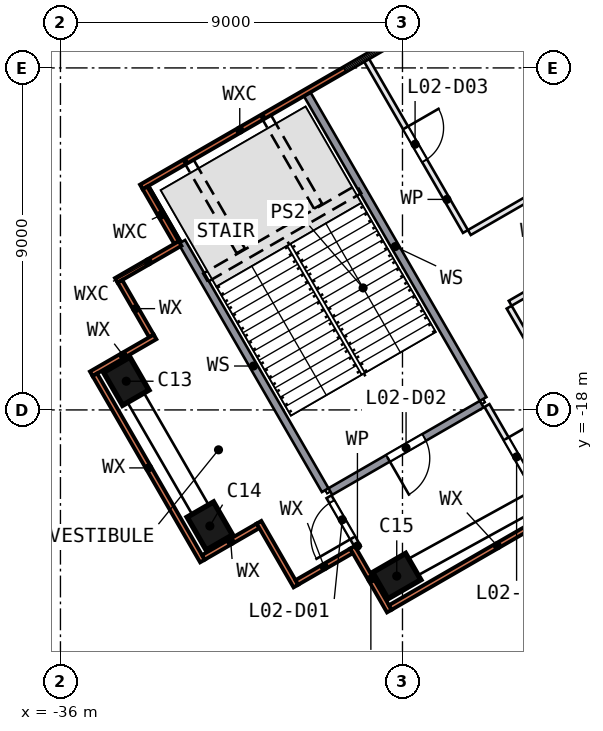
"""IFC4 building model, lengths in metres.
Left out: names, types, materials, properties, quantities, classifications, styles, units other than length and angle.
Written with IfcOpenShell. Run it as: python <this file> out.ifc"""

import sys

from ifc_helpers import new_model, si_unit, direction, frame, frame_2d, origin, origin_2d, place, context, subcontext, project, spatial, rectangle, extrude, element, fill, save


model = new_model("IFC4")
c1 = context("Model", 3, precision=1e-05, world=origin(), true_north=direction((0.0, 1.0)))
c2 = subcontext(c1, "Body", "Model", "MODEL_VIEW")
j1 = project(units=[si_unit("LENGTHUNIT", "METRE"), si_unit("PLANEANGLEUNIT", "RADIAN")], contexts=[c1])
p1 = place(None, origin())
s1 = spatial("IfcSite", under=j1, at=p1, CompositionType="ELEMENT")
p2 = place(p1, origin())
s2 = spatial("IfcBuilding", under=s1, at=p2, CompositionType="ELEMENT")
p3 = place(p2, frame((0.0, 0.0, 14.0)))
s3 = spatial("IfcBuildingStorey", under=s2, at=p3, CompositionType="ELEMENT", Elevation=14.0)
for number, where, z_axis, x_axis in (
    (1, (-34.269, -17.245, 0.0), (0.0, 0.0, 1.0), (0.5, -0.866, 0.0)),
    (2, (-32.069, -21.055, 0.0), (0.0, 0.0, 1.0), (0.5, -0.866, 0.0)),
    (3, (-27.151, -22.373, 0.0), (0.0, 0.0, 1.0), (0.866, 0.5, 0.0)),
):
    element("IfcColumn", number, at=place(p3, frame(where, z_axis=z_axis, x_axis=x_axis)), inside=s3, PredefinedType="COLUMN", context=c2, shape_type="SweptSolid", body=[
        extrude(rectangle(XDim=1.0, YDim=0.8, at=origin_2d()), origin(), (0.0, 0.0, 1.0), 4.55),
    ])
p4 = place(p3, frame((-23.995, -6.429, 0.0), z_axis=(0.0, 0.0, 1.0), x_axis=(-0.866018753, -0.500011519, 0.0)))
e4 = element("IfcWall", 4, at=p4, inside=s3, PredefinedType="SOLIDWALL", context=c2, shape_type="SweptSolid", body=[
    extrude(rectangle(XDim=11.405, YDim=0.14, at=frame_2d((5.703, 0.0))), origin(), (0.0, 0.0, 1.0), 4.55),
])
p5 = place(p4, frame((1.623, 0.0, 0.9)))
e5 = element("IfcOpeningElement", 5, at=p5, cuts=e4, PredefinedType="OPENING", context=c2, shape_type="SweptSolid", body=[
    extrude(rectangle(XDim=3.6, YDim=2.7, at=frame_2d((1.8, 1.35))), frame((0.0, 0.08, 0.0), z_axis=(0.0, -1.0, 0.0), x_axis=(1.0, 0.0, 0.0)), (0.0, 0.0, 1.0), 0.16),
])
p6 = place(p3, frame((-33.777, -12.157, 0.0), z_axis=(0.0, 0.0, 1.0), x_axis=(0.499887958, -0.866090081, 0.0)))
e6 = element("IfcWall", 6, at=p6, inside=s3, PredefinedType="SOLIDWALL", context=c2, shape_type="SweptSolid", body=[
    extrude(rectangle(XDim=1.66, YDim=0.14, at=frame_2d((0.83, 0.0))), origin(), (0.0, 0.0, 1.0), 4.55),
])
p7 = place(p3, frame((-32.851, -13.62, 0.0), z_axis=(0.0, 0.0, 1.0), x_axis=(-0.866011627, -0.500023862, 0.0)))
e7 = element("IfcWall", 7, at=p7, inside=s3, PredefinedType="SOLIDWALL", context=c2, shape_type="SweptSolid", body=[
    extrude(rectangle(XDim=1.94, YDim=0.14, at=frame_2d((0.97, 0.0))), origin(), (0.0, 0.0, 1.0), 4.55),
])
p8 = place(p3, frame((-34.436, -14.616, 0.0), z_axis=(0.0, 0.0, 1.0), x_axis=(0.500061949, -0.865989634, 0.0)))
e8 = element("IfcWall", 8, at=p8, inside=s3, PredefinedType="SOLIDWALL", context=c2, shape_type="SweptSolid", body=[
    extrude(rectangle(XDim=1.66, YDim=0.14, at=frame_2d((0.83, 0.0))), origin(), (0.0, 0.0, 1.0), 4.55),
])
p9 = place(p3, frame((-33.51, -16.079, 0.0), z_axis=(0.0, 0.0, 1.0), x_axis=(-0.866011627, -0.500023862, 0.0)))
e9 = element("IfcWall", 9, at=p9, inside=s3, PredefinedType="SOLIDWALL", context=c2, shape_type="SweptSolid", body=[
    extrude(rectangle(XDim=1.94, YDim=0.14, at=frame_2d((0.97, 0.0))), origin(), (0.0, 0.0, 1.0), 4.55),
])
p10 = place(p3, frame((-35.094, -17.075, 0.0), z_axis=(0.0, 0.0, 1.0), x_axis=(0.499998748, -0.866026127, 0.0)))
e10 = element("IfcWall", 10, at=p10, inside=s3, PredefinedType="SOLIDWALL", context=c2, shape_type="SweptSolid", body=[
    extrude(rectangle(XDim=5.66, YDim=0.14, at=frame_2d((2.83, 0.0))), origin(), (0.0, 0.0, 1.0), 4.55),
])
p11 = place(p3, frame((-32.239, -21.881, 0.0), z_axis=(0.0, 0.0, 1.0), x_axis=(0.866026406, 0.499998264, 0.0)))
e11 = element("IfcWall", 11, at=p11, inside=s3, PredefinedType="SOLIDWALL", context=c2, shape_type="SweptSolid", body=[
    extrude(rectangle(XDim=1.66, YDim=0.14, at=frame_2d((0.83, 0.0))), origin(), (0.0, 0.0, 1.0), 4.55),
])
p12 = place(p3, frame((-30.775, -20.955, 0.0), z_axis=(0.0, 0.0, 1.0), x_axis=(0.499969368, -0.866043088, 0.0)))
e12 = element("IfcWall", 12, at=p12, inside=s3, PredefinedType="SOLIDWALL", context=c2, shape_type="SweptSolid", body=[
    extrude(rectangle(XDim=1.94, YDim=0.14, at=frame_2d((0.97, 0.0))), origin(), (0.0, 0.0, 1.0), 4.55),
])
p13 = place(p3, frame((-29.78, -22.54, 0.0), z_axis=(0.0, 0.0, 1.0), x_axis=(0.865989634, 0.500061949, 0.0)))
e13 = element("IfcWall", 13, at=p13, inside=s3, PredefinedType="SOLIDWALL", context=c2, shape_type="SweptSolid", body=[
    extrude(rectangle(XDim=1.66, YDim=0.14, at=frame_2d((0.83, 0.0))), origin(), (0.0, 0.0, 1.0), 4.55),
])
p14 = place(p3, frame((-28.317, -21.614, 0.0), z_axis=(0.0, 0.0, 1.0), x_axis=(0.499969368, -0.866043088, 0.0)))
e14 = element("IfcWall", 14, at=p14, inside=s3, PredefinedType="SOLIDWALL", context=c2, shape_type="SweptSolid", body=[
    extrude(rectangle(XDim=1.94, YDim=0.14, at=frame_2d((0.97, 0.0))), origin(), (0.0, 0.0, 1.0), 4.55),
])
p15 = place(p3, frame((-27.321, -23.198, 0.0), z_axis=(0.0, 0.0, 1.0), x_axis=(0.866030546, 0.499991093, 0.0)))
e15 = element("IfcWall", 15, at=p15, inside=s3, PredefinedType="SOLIDWALL", context=c2, shape_type="SweptSolid", body=[
    extrude(rectangle(XDim=10.961, YDim=0.14, at=frame_2d((5.48, 0.0))), origin(), (0.0, 0.0, 1.0), 4.55),
])
p16 = place(p15, frame((6.702, 0.0, 0.9)))
e16 = element("IfcOpeningElement", 16, at=p16, cuts=e15, PredefinedType="OPENING", context=c2, shape_type="SweptSolid", body=[
    extrude(rectangle(XDim=3.0, YDim=2.7, at=frame_2d((1.5, 1.35))), frame((0.0, 0.08, 0.0), z_axis=(0.0, -1.0, 0.0), x_axis=(1.0, 0.0, 0.0)), (0.0, 0.0, 1.0), 0.16),
])
p17 = place(p3, frame((-32.807, -13.577, 0.0), z_axis=(0.0, 0.0, 1.0), x_axis=(0.50000534, -0.866022321, 0.0)))
e17 = element("IfcWall", 17, at=p17, inside=s3, PredefinedType="SOLIDWALL", context=c2, shape_type="SweptSolid", body=[
    extrude(rectangle(XDim=7.545, YDim=0.2, at=frame_2d((3.773, 0.0))), origin(), (0.0, 0.0, 1.0), 4.55),
])
p18 = place(p3, frame((-28.162, -21.623, 0.0), z_axis=(0.0, 0.0, 1.0), x_axis=(-0.499877454, 0.866096144, 0.0)))
e18 = element("IfcWall", 18, at=p18, inside=s3, PredefinedType="PARTITIONING", context=c2, shape_type="SweptSolid", body=[
    extrude(rectangle(XDim=1.545, YDim=0.15, at=frame_2d((0.773, 0.0))), origin(), (0.0, 0.0, 1.0), 4.55),
])
p19 = place(p18, frame((0.295, 0.0, 0.0)))
e19 = element("IfcOpeningElement", 19, at=p19, cuts=e18, PredefinedType="OPENING", context=c2, shape_type="SweptSolid", body=[
    extrude(rectangle(XDim=1.1, YDim=2.1, at=frame_2d((0.55, 1.05))), frame((0.0, 0.085, 0.0), z_axis=(0.0, -1.0, 0.0), x_axis=(1.0, 0.0, 0.0)), (0.0, 0.0, 1.0), 0.17),
])
p20 = place(p3, frame((-24.914, -17.848, 0.0), z_axis=(0.0, 0.0, 1.0), x_axis=(-0.86601677, -0.500014953, 0.0)))
e20 = element("IfcWall", 20, at=p20, inside=s3, PredefinedType="SOLIDWALL", context=c2, shape_type="SweptSolid", body=[
    extrude(rectangle(XDim=4.6, YDim=0.2, at=frame_2d((2.3, 0.0))), origin(), (0.0, 0.0, 1.0), 4.55),
])
p21 = place(p20, frame((1.75, 0.0, 0.0)))
e21 = element("IfcOpeningElement", 21, at=p21, cuts=e20, PredefinedType="OPENING", context=c2, shape_type="SweptSolid", body=[
    extrude(rectangle(XDim=1.1, YDim=2.1, at=frame_2d((0.55, 1.05))), frame((0.0, 0.11, 0.0), z_axis=(0.0, -1.0, 0.0), x_axis=(1.0, 0.0, 0.0)), (0.0, 0.0, 1.0), 0.22),
])
p22 = place(p3, frame((-27.948, -8.792, 0.0), z_axis=(0.0, 0.0, 1.0), x_axis=(0.499979347, -0.866037328, 0.0)))
e22 = element("IfcWall", 22, at=p22, inside=s3, PredefinedType="PARTITIONING", context=c2, shape_type="SweptSolid", body=[
    extrude(rectangle(XDim=5.21, YDim=0.15, at=frame_2d((2.605, 0.0))), origin(), (0.0, 0.0, 1.0), 4.55),
])
p23 = place(p22, frame((2.06, 0.0, 0.0)))
e23 = element("IfcOpeningElement", 23, at=p23, cuts=e22, PredefinedType="OPENING", context=c2, shape_type="SweptSolid", body=[
    extrude(rectangle(XDim=1.0, YDim=2.1, at=frame_2d((0.5, 1.05))), frame((0.0, 0.085, 0.0), z_axis=(0.0, -1.0, 0.0), x_axis=(1.0, 0.0, 0.0)), (0.0, 0.0, 1.0), 0.17),
])
p24 = place(p3, frame((-24.877, -17.712, 0.0), z_axis=(0.0, 0.0, 1.0), x_axis=(-0.499984148, 0.866034555, 0.0)))
e24 = element("IfcWall", 24, at=p24, inside=s3, PredefinedType="SOLIDWALL", context=c2, shape_type="SweptSolid", body=[
    extrude(rectangle(XDim=9.26, YDim=0.2, at=frame_2d((4.63, 0.0))), origin(), (0.0, 0.0, 1.0), 4.55),
])
p25 = place(p3, frame((-20.886, -13.3, 0.0), z_axis=(0.0, 0.0, 1.0), x_axis=(-0.866012734, -0.500021944, 0.0)))
e25 = element("IfcWall", 25, at=p25, inside=s3, PredefinedType="PARTITIONING", context=c2, shape_type="SweptSolid", body=[
    extrude(rectangle(XDim=3.787, YDim=0.15, at=frame_2d((1.894, 0.0))), origin(), (0.0, 0.0, 1.0), 4.55),
])
p26 = place(p25, frame((1.437, 0.0, 0.0)))
e26 = element("IfcOpeningElement", 26, at=p26, cuts=e25, PredefinedType="OPENING", context=c2, shape_type="SweptSolid", body=[
    extrude(rectangle(XDim=1.0, YDim=2.1, at=frame_2d((0.5, 1.05))), frame((0.0, 0.085, 0.0), z_axis=(0.0, -1.0, 0.0), x_axis=(1.0, 0.0, 0.0)), (0.0, 0.0, 1.0), 0.17),
])
p27 = place(p3, frame((-24.777, -17.885, 0.0), z_axis=(0.0, 0.0, 1.0), x_axis=(0.499996863, -0.866027215, 0.0)))
e27 = element("IfcWall", 27, at=p27, inside=s3, PredefinedType="PARTITIONING", context=c2, shape_type="SweptSolid", body=[
    extrude(rectangle(XDim=3.26, YDim=0.15, at=frame_2d((1.63, 0.0))), origin(), (0.0, 0.0, 1.0), 4.55),
])
p28 = place(p27, frame((1.01, 0.0, 0.0)))
e28 = element("IfcOpeningElement", 28, at=p28, cuts=e27, PredefinedType="OPENING", context=c2, shape_type="SweptSolid", body=[
    extrude(rectangle(XDim=1.1, YDim=2.1, at=frame_2d((0.55, 1.05))), frame((0.0, 0.085, 0.0), z_axis=(0.0, -1.0, 0.0), x_axis=(1.0, 0.0, 0.0)), (0.0, 0.0, 1.0), 0.17),
])
p29 = place(p3, frame((-21.588, -19.808, 0.0), z_axis=(0.0, 0.0, 1.0), x_axis=(-0.499999637, 0.866025613, 0.0)))
e29 = element("IfcWall", 29, at=p29, inside=s3, PredefinedType="PARTITIONING", context=c2, shape_type="SweptSolid", body=[
    extrude(rectangle(XDim=5.21, YDim=0.15, at=frame_2d((2.605, 0.0))), origin(), (0.0, 0.0, 1.0), 4.55),
])
p30 = place(p3, frame((-21.961, -11.438, 0.0), z_axis=(0.0, 0.0, 1.0), x_axis=(-0.866040651, -0.499973591, 0.0)))
e30 = element("IfcWall", 30, at=p30, inside=s3, PredefinedType="PARTITIONING", context=c2, shape_type="SweptSolid", body=[
    extrude(rectangle(XDim=3.787, YDim=0.15, at=frame_2d((1.894, 0.0))), origin(), (0.0, 0.0, 1.0), 4.55),
])
p31 = place(p5, origin())
e31 = element("IfcWindow", 31, at=p31, inside=s3, PartitioningType="SINGLE_PANEL", PredefinedType="WINDOW", context=c2, shape_type="SweptSolid", body=[
    extrude(rectangle(XDim=3.6, YDim=2.7, at=frame_2d((1.8, 1.35))), frame((0.0, 0.03, 0.0), z_axis=(0.0, -1.0, 0.0), x_axis=(1.0, 0.0, 0.0)), (0.0, 0.0, 1.0), 0.06),
])
fill(e5, e31)
p32 = place(p19, origin())
e32 = element("IfcDoor", 32, at=p32, inside=s3, OperationType="SINGLE_SWING_LEFT", PredefinedType="DOOR", context=c2, shape_type="SweptSolid", body=[
    extrude(rectangle(XDim=1.1, YDim=2.1, at=frame_2d((0.55, 1.05))), frame((0.0, 0.025, 0.0), z_axis=(0.0, -1.0, 0.0), x_axis=(1.0, 0.0, 0.0)), (0.0, 0.0, 1.0), 0.05),
])
fill(e19, e32)
p33 = place(p21, origin())
e33 = element("IfcDoor", 33, at=p33, inside=s3, OperationType="SINGLE_SWING_RIGHT", PredefinedType="DOOR", context=c2, shape_type="SweptSolid", body=[
    extrude(rectangle(XDim=1.1, YDim=2.1, at=frame_2d((0.55, 1.05))), frame((0.0, 0.025, 0.0), z_axis=(0.0, -1.0, 0.0), x_axis=(1.0, 0.0, 0.0)), (0.0, 0.0, 1.0), 0.05),
])
fill(e21, e33)
p34 = place(p23, origin())
e34 = element("IfcDoor", 34, at=p34, inside=s3, OperationType="SINGLE_SWING_LEFT", PredefinedType="DOOR", context=c2, shape_type="SweptSolid", body=[
    extrude(rectangle(XDim=1.0, YDim=2.1, at=frame_2d((0.5, 1.05))), frame((0.0, 0.025, 0.0), z_axis=(0.0, -1.0, 0.0), x_axis=(1.0, 0.0, 0.0)), (0.0, 0.0, 1.0), 0.05),
])
fill(e23, e34)
p35 = place(p28, origin())
e35 = element("IfcDoor", 35, at=p35, inside=s3, OperationType="SINGLE_SWING_LEFT", PredefinedType="DOOR", context=c2, shape_type="SweptSolid", body=[
    extrude(rectangle(XDim=1.1, YDim=2.1, at=frame_2d((0.55, 1.05))), frame((0.0, 0.025, 0.0), z_axis=(0.0, -1.0, 0.0), x_axis=(1.0, 0.0, 0.0)), (0.0, 0.0, 1.0), 0.05),
])
fill(e28, e35)
save(model, sys.argv[1])
